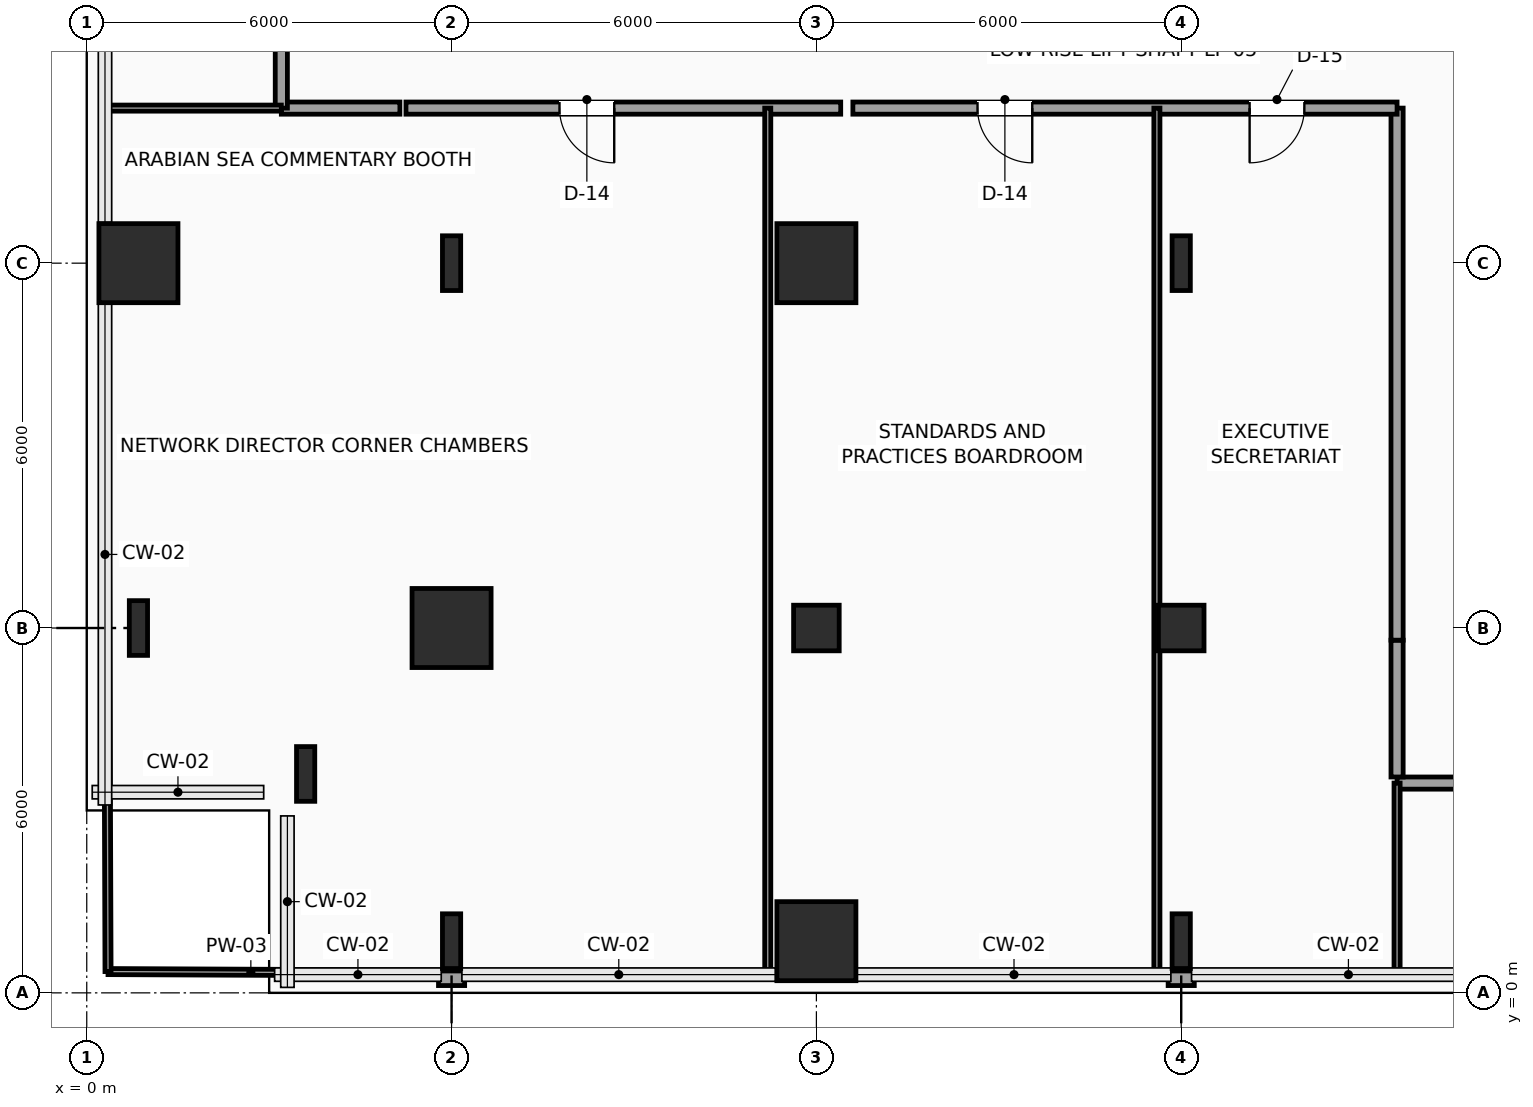
"""IFC4 building model, lengths in metres.
Left out: names, types, materials, properties, quantities, classifications, styles, units other than length and angle.
Written with IfcOpenShell. Run it as: python <this file> out.ifc"""

import sys

from ifc_helpers import new_model, si_unit, direction, frame, frame_2d, origin, origin_2d, place, context, subcontext, project, spatial, rectangle, hollow_rectangle, i_section, extrude, element, fill, save


model = new_model("IFC4")
c1 = context("Model", 3, precision=1e-05, world=origin(), true_north=direction((0.0, 1.0)))
c2 = subcontext(c1, "Body", "Model", "MODEL_VIEW")
j1 = project(units=[si_unit("LENGTHUNIT", "METRE"), si_unit("PLANEANGLEUNIT", "RADIAN")], contexts=[c1])
p1 = place(None, origin())
s1 = spatial("IfcSite", under=j1, at=p1, CompositionType="ELEMENT")
p2 = place(p1, origin())
s2 = spatial("IfcBuilding", under=s1, at=p2, CompositionType="ELEMENT")
p3 = place(p2, frame((0.0, 0.0, 87.0)))
s3 = spatial("IfcBuildingStorey", under=s2, at=p3, CompositionType="ELEMENT", Elevation=87.0)
for number, where, z_axis, x_axis in (
    (1, (3.6, 3.6, 0.0), (0.0, 0.0, 1.0), (1.0, 0.0, 0.0)),
    (2, (0.85, 6.0, 0.0), (0.0, 0.0, 1.0), (1.0, 0.0, 0.0)),
):
    element("IfcColumn", number, at=place(p3, frame(where, z_axis=z_axis, x_axis=x_axis)), inside=s3, PredefinedType="COLUMN", context=c2, shape_type="SweptSolid", body=[
        extrude(i_section(OverallWidth=0.3, OverallDepth=0.9, WebThickness=0.019, FlangeThickness=0.035, FilletRadius=0.03, at=origin_2d()), origin(), (0.0, 0.0, 1.0), 3.9),
    ])
p4 = place(p3, frame((0.85, 12.0, 0.0), z_axis=(0.0, 0.0, 1.0), x_axis=(1.0, 0.0, 0.0)))
e3 = element("IfcColumn", 3, at=p4, inside=s3, PredefinedType="COLUMN", context=c2, shape_type="SweptSolid", body=[
    extrude(rectangle(XDim=1.3, YDim=1.3, at=origin_2d()), origin(), (0.0, 0.0, 1.0), 3.9),
])
p5 = place(p3, frame((6.0, 0.85, 0.0), z_axis=(0.0, 0.0, 1.0), x_axis=(1.0, 0.0, 0.0)))
e4 = element("IfcColumn", 4, at=p5, inside=s3, PredefinedType="COLUMN", context=c2, shape_type="SweptSolid", body=[
    extrude(i_section(OverallWidth=0.3, OverallDepth=0.9, WebThickness=0.019, FlangeThickness=0.035, FilletRadius=0.03, at=origin_2d()), origin(), (0.0, 0.0, 1.0), 3.9),
])
p6 = place(p3, frame((6.0, 6.0, 0.0), z_axis=(0.0, 0.0, 1.0), x_axis=(1.0, 0.0, 0.0)))
e5 = element("IfcColumn", 5, at=p6, inside=s3, PredefinedType="COLUMN", context=c2, shape_type="SweptSolid", body=[
    extrude(rectangle(XDim=1.3, YDim=1.3, at=origin_2d()), origin(), (0.0, 0.0, 1.0), 3.9),
])
p7 = place(p3, frame((6.0, 12.0, 0.0), z_axis=(0.0, 0.0, 1.0), x_axis=(1.0, 0.0, 0.0)))
e6 = element("IfcColumn", 6, at=p7, inside=s3, PredefinedType="COLUMN", context=c2, shape_type="SweptSolid", body=[
    extrude(i_section(OverallWidth=0.3, OverallDepth=0.9, WebThickness=0.019, FlangeThickness=0.035, FilletRadius=0.03, at=origin_2d()), origin(), (0.0, 0.0, 1.0), 3.9),
])
p8 = place(p3, frame((12.0, 0.85, 0.0), z_axis=(0.0, 0.0, 1.0), x_axis=(1.0, 0.0, 0.0)))
e7 = element("IfcColumn", 7, at=p8, inside=s3, PredefinedType="COLUMN", context=c2, shape_type="SweptSolid", body=[
    extrude(rectangle(XDim=1.3, YDim=1.3, at=origin_2d()), origin(), (0.0, 0.0, 1.0), 3.9),
])
p9 = place(p3, frame((12.0, 6.0, 0.0), z_axis=(0.0, 0.0, 1.0), x_axis=(1.0, 0.0, 0.0)))
e8 = element("IfcColumn", 8, at=p9, inside=s3, PredefinedType="COLUMN", context=c2, shape_type="SweptSolid", body=[
    extrude(hollow_rectangle(XDim=0.75, YDim=0.75, WallThickness=0.035, InnerFilletRadius=0.035, OuterFilletRadius=0.05, at=origin_2d()), origin(), (0.0, 0.0, 1.0), 3.9),
])
p10 = place(p3, frame((12.0, 12.0, 0.0), z_axis=(0.0, 0.0, 1.0), x_axis=(1.0, 0.0, 0.0)))
e9 = element("IfcColumn", 9, at=p10, inside=s3, PredefinedType="COLUMN", context=c2, shape_type="SweptSolid", body=[
    extrude(rectangle(XDim=1.3, YDim=1.3, at=origin_2d()), origin(), (0.0, 0.0, 1.0), 3.9),
])
p11 = place(p3, frame((18.0, 0.85, 0.0), z_axis=(0.0, 0.0, 1.0), x_axis=(1.0, 0.0, 0.0)))
e10 = element("IfcColumn", 10, at=p11, inside=s3, PredefinedType="COLUMN", context=c2, shape_type="SweptSolid", body=[
    extrude(i_section(OverallWidth=0.3, OverallDepth=0.9, WebThickness=0.019, FlangeThickness=0.035, FilletRadius=0.03, at=origin_2d()), origin(), (0.0, 0.0, 1.0), 3.9),
])
p12 = place(p3, frame((18.0, 6.0, 0.0), z_axis=(0.0, 0.0, 1.0), x_axis=(1.0, 0.0, 0.0)))
e11 = element("IfcColumn", 11, at=p12, inside=s3, PredefinedType="COLUMN", context=c2, shape_type="SweptSolid", body=[
    extrude(hollow_rectangle(XDim=0.75, YDim=0.75, WallThickness=0.035, InnerFilletRadius=0.035, OuterFilletRadius=0.05, at=origin_2d()), origin(), (0.0, 0.0, 1.0), 3.9),
])
p13 = place(p3, frame((18.0, 12.0, 0.0), z_axis=(0.0, 0.0, 1.0), x_axis=(1.0, 0.0, 0.0)))
e12 = element("IfcColumn", 12, at=p13, inside=s3, PredefinedType="COLUMN", context=c2, shape_type="SweptSolid", body=[
    extrude(i_section(OverallWidth=0.3, OverallDepth=0.9, WebThickness=0.019, FlangeThickness=0.035, FilletRadius=0.03, at=origin_2d()), origin(), (0.0, 0.0, 1.0), 3.9),
])
for number, where, z_axis, x_axis in (
    (13, (18.215, 0.24, 0.0), (0.0, 0.0, 1.0), (-1.0, 0.0, 0.0)),
    (14, (6.215, 0.24, 0.0), (0.0, 0.0, 1.0), (-1.0, 0.0, 0.0)),
):
    element("IfcWall", number, at=place(p3, frame(where, z_axis=z_axis, x_axis=x_axis)), inside=s3, PredefinedType="SOLIDWALL", context=c2, shape_type="SweptSolid", body=[
        extrude(rectangle(XDim=0.43, YDim=0.24, at=frame_2d((0.215, 0.0))), origin(), (0.0, 0.0, 1.0), 3.65),
    ])
p14 = place(p3, frame((36.15, 3.45, 0.0), z_axis=(0.0, 0.0, 1.0), x_axis=(-1.0, 0.0, 0.0)))
e15 = element("IfcWall", 15, at=p14, inside=s3, PredefinedType="SOLIDWALL", context=c2, shape_type="SweptSolid", body=[
    extrude(rectangle(XDim=14.6, YDim=0.2, at=frame_2d((7.3, 0.0))), origin(), (0.0, 0.0, 1.0), 3.142),
])
p15 = place(p14, frame((11.325, 0.0, 0.0)))
e16 = element("IfcOpeningElement", 16, at=p15, cuts=e15, PredefinedType="OPENING", context=c2, shape_type="SweptSolid", body=[
    extrude(rectangle(XDim=0.9, YDim=2.1, at=frame_2d((0.45, 1.05))), frame((0.0, 0.11, 0.0), z_axis=(0.0, -1.0, 0.0), x_axis=(1.0, 0.0, 0.0)), (0.0, 0.0, 1.0), 0.22),
])
p16 = place(p14, frame((5.7, 0.0, 0.0)))
e17 = element("IfcOpeningElement", 17, at=p16, cuts=e15, PredefinedType="OPENING", context=c2, shape_type="SweptSolid", body=[
    extrude(rectangle(XDim=0.9, YDim=2.1, at=frame_2d((0.45, 1.05))), frame((0.0, 0.11, 0.0), z_axis=(0.0, -1.0, 0.0), x_axis=(1.0, 0.0, 0.0)), (0.0, 0.0, 1.0), 0.22),
])
p17 = place(p3, frame((21.55, 3.55, 0.0), z_axis=(0.0, 0.0, 1.0), x_axis=(0.0, 1.0, 0.0)))
e18 = element("IfcWall", 18, at=p17, inside=s3, PredefinedType="SOLIDWALL", context=c2, shape_type="SweptSolid", body=[
    extrude(rectangle(XDim=2.25, YDim=0.2, at=frame_2d((1.125, 0.0))), origin(), (0.0, 0.0, 1.0), 3.65),
])
p18 = place(p3, frame((21.55, 5.8, 0.0), z_axis=(0.0, 0.0, 1.0), x_axis=(0.0, 1.0, 0.0)))
e19 = element("IfcWall", 19, at=p18, inside=s3, PredefinedType="SOLIDWALL", context=c2, shape_type="SweptSolid", body=[
    extrude(rectangle(XDim=8.75, YDim=0.2, at=frame_2d((4.375, 0.0))), origin(), (0.0, 0.0, 1.0), 3.65),
])
p19 = place(p3, frame((21.55, 14.55, 0.0), z_axis=(0.0, 0.0, 1.0), x_axis=(-1.0, 0.0, 0.0)))
e20 = element("IfcWall", 20, at=p19, inside=s3, PredefinedType="SOLIDWALL", context=c2, shape_type="SweptSolid", body=[
    extrude(rectangle(XDim=8.95, YDim=0.2, at=frame_2d((4.475, 0.0))), origin(), (0.0, 0.0, 1.0), 3.65),
])
p20 = place(p19, frame((6.0, 0.0, 0.0)))
e21 = element("IfcOpeningElement", 21, at=p20, cuts=e20, PredefinedType="OPENING", context=c2, shape_type="SweptSolid", body=[
    extrude(rectangle(XDim=0.9, YDim=2.1, at=frame_2d((0.45, 1.05))), frame((0.0, 0.11, 0.0), z_axis=(0.0, -1.0, 0.0), x_axis=(1.0, 0.0, 0.0)), (0.0, 0.0, 1.0), 0.22),
])
p21 = place(p19, frame((1.525, 0.0, 0.0)))
e22 = element("IfcOpeningElement", 22, at=p21, cuts=e20, PredefinedType="OPENING", context=c2, shape_type="SweptSolid", body=[
    extrude(rectangle(XDim=0.9, YDim=2.1, at=frame_2d((0.45, 1.05))), frame((0.0, 0.11, 0.0), z_axis=(0.0, -1.0, 0.0), x_axis=(1.0, 0.0, 0.0)), (0.0, 0.0, 1.0), 0.22),
])
p22 = place(p3, frame((12.4, 14.55, 0.0), z_axis=(0.0, 0.0, 1.0), x_axis=(-1.0, 0.0, 0.0)))
e23 = element("IfcWall", 23, at=p22, inside=s3, PredefinedType="SOLIDWALL", context=c2, shape_type="SweptSolid", body=[
    extrude(rectangle(XDim=7.15, YDim=0.2, at=frame_2d((3.575, 0.0))), origin(), (0.0, 0.0, 1.0), 3.65),
])
p23 = place(p22, frame((3.725, 0.0, 0.0)))
e24 = element("IfcOpeningElement", 24, at=p23, cuts=e23, PredefinedType="OPENING", context=c2, shape_type="SweptSolid", body=[
    extrude(rectangle(XDim=0.9, YDim=2.1, at=frame_2d((0.45, 1.05))), frame((0.0, 0.11, 0.0), z_axis=(0.0, -1.0, 0.0), x_axis=(1.0, 0.0, 0.0)), (0.0, 0.0, 1.0), 0.22),
])
p24 = place(p3, frame((5.15, 14.55, 0.0), z_axis=(0.0, 0.0, 1.0), x_axis=(-1.0, 0.0, 0.0)))
e25 = element("IfcWall", 25, at=p24, inside=s3, PredefinedType="SOLIDWALL", context=c2, shape_type="SweptSolid", body=[
    extrude(rectangle(XDim=1.95, YDim=0.2, at=frame_2d((0.975, 0.0))), origin(), (0.0, 0.0, 1.0), 3.65),
])
p25 = place(p3, frame((3.2, 14.55, 0.0), z_axis=(0.0, 0.0, 1.0), x_axis=(0.0, 1.0, 0.0)))
e26 = element("IfcWall", 26, at=p25, inside=s3, PredefinedType="SOLIDWALL", context=c2, shape_type="SweptSolid", body=[
    extrude(rectangle(XDim=15.7, YDim=0.2, at=frame_2d((7.85, 0.0))), origin(), (0.0, 0.0, 1.0), 3.65),
])
p26 = place(p25, frame((2.65, 0.0, 0.0)))
e27 = element("IfcOpeningElement", 27, at=p26, cuts=e26, PredefinedType="OPENING", context=c2, shape_type="SweptSolid", body=[
    extrude(rectangle(XDim=0.9, YDim=2.1, at=frame_2d((0.45, 1.05))), frame((0.0, 0.11, 0.0), z_axis=(0.0, -1.0, 0.0), x_axis=(1.0, 0.0, 0.0)), (0.0, 0.0, 1.0), 0.22),
])
p27 = place(p25, frame((8.85, 0.0, 0.0)))
e28 = element("IfcOpeningElement", 28, at=p27, cuts=e26, PredefinedType="OPENING", context=c2, shape_type="SweptSolid", body=[
    extrude(rectangle(XDim=0.9, YDim=2.1, at=frame_2d((0.45, 1.05))), frame((0.0, 0.11, 0.0), z_axis=(0.0, -1.0, 0.0), x_axis=(1.0, 0.0, 0.0)), (0.0, 0.0, 1.0), 0.22),
])
p28 = place(p25, frame((13.6, 0.0, 0.0)))
e29 = element("IfcOpeningElement", 29, at=p28, cuts=e26, PredefinedType="OPENING", context=c2, shape_type="SweptSolid", body=[
    extrude(rectangle(XDim=0.9, YDim=2.1, at=frame_2d((0.45, 1.05))), frame((0.0, 0.11, 0.0), z_axis=(0.0, -1.0, 0.0), x_axis=(1.0, 0.0, 0.0)), (0.0, 0.0, 1.0), 0.22),
])
p29 = place(p3, frame((0.35, 0.35, 0.0), z_axis=(0.0, 0.0, 1.0), x_axis=(0.99998929595, -0.004626876487, 0.0)))
e30 = element("IfcWall", 30, at=p29, inside=s3, PredefinedType="PARTITIONING", context=c2, shape_type="SweptSolid", body=[
    extrude(rectangle(XDim=5.435, YDim=0.1, at=frame_2d((2.717, 0.0))), origin(), (0.0, 0.0, 1.0), 3.65),
])
p30 = place(p3, frame((6.215, 0.323, 0.0), z_axis=(0.0, 0.0, 1.0), x_axis=(0.999989402769, -0.00460373219, 0.0)))
e31 = element("IfcWall", 31, at=p30, inside=s3, PredefinedType="PARTITIONING", context=c2, shape_type="SweptSolid", body=[
    extrude(rectangle(XDim=4.985, YDim=0.1, at=frame_2d((2.492, 0.0))), origin(), (0.0, 0.0, 1.0), 3.65),
])
p31 = place(p3, frame((0.35, 0.35, 0.0), z_axis=(0.0, 0.0, 1.0), x_axis=(-0.003524555588, 0.999993788735, 0.0)))
e32 = element("IfcWall", 32, at=p31, inside=s3, PredefinedType="PARTITIONING", context=c2, shape_type="SweptSolid", body=[
    extrude(rectangle(XDim=14.2, YDim=0.1, at=frame_2d((7.1, 0.0))), origin(), (0.0, 0.0, 1.0), 3.65),
])
for number, where, z_axis, x_axis in (
    (33, (11.2, 0.3, 0.0), (0.0, 0.0, 1.0), (0.0, 1.0, 0.0)),
    (34, (17.6, 0.3, 0.0), (0.0, 0.0, 1.0), (0.0, 1.0, 0.0)),
):
    element("IfcWall", number, at=place(p3, frame(where, z_axis=z_axis, x_axis=x_axis)), inside=s3, PredefinedType="PARTITIONING", context=c2, shape_type="SweptSolid", body=[
        extrude(rectangle(XDim=14.25, YDim=0.1, at=frame_2d((7.125, 0.0))), origin(), (0.0, 0.0, 1.0), 3.65),
    ])
p32 = place(p3, frame((0.3, 14.55, 0.0), z_axis=(0.0, 0.0, 1.0), x_axis=(1.0, 0.0, 0.0)))
e35 = element("IfcWall", 35, at=p32, inside=s3, PredefinedType="PARTITIONING", context=c2, shape_type="SweptSolid", body=[
    extrude(rectangle(XDim=2.9, YDim=0.1, at=frame_2d((1.45, 0.0))), origin(), (0.0, 0.0, 1.0), 3.65),
])
p33 = place(p3, frame((21.55, 0.3, 0.0), z_axis=(0.0, 0.0, 1.0), x_axis=(0.0, 1.0, 0.0)))
e36 = element("IfcWall", 36, at=p33, inside=s3, PredefinedType="PARTITIONING", context=c2, shape_type="SweptSolid", body=[
    extrude(rectangle(XDim=3.15, YDim=0.1, at=frame_2d((1.575, 0.0))), origin(), (0.0, 0.0, 1.0), 3.65),
])
p34 = place(p20, origin())
e37 = element("IfcDoor", 37, at=p34, inside=s3, OperationType="SINGLE_SWING_LEFT", PredefinedType="DOOR", context=c2, shape_type="SweptSolid", body=[
    extrude(rectangle(XDim=0.9, YDim=2.1, at=frame_2d((0.45, 1.05))), frame((0.0, 0.025, 0.0), z_axis=(0.0, -1.0, 0.0), x_axis=(1.0, 0.0, 0.0)), (0.0, 0.0, 1.0), 0.05),
])
fill(e21, e37)
p35 = place(p21, origin())
e38 = element("IfcDoor", 38, at=p35, inside=s3, OperationType="SINGLE_SWING_RIGHT", PredefinedType="DOOR", context=c2, shape_type="SweptSolid", body=[
    extrude(rectangle(XDim=0.9, YDim=2.1, at=frame_2d((0.45, 1.05))), frame((0.0, 0.025, 0.0), z_axis=(0.0, -1.0, 0.0), x_axis=(1.0, 0.0, 0.0)), (0.0, 0.0, 1.0), 0.05),
])
fill(e22, e38)
p36 = place(p23, origin())
e39 = element("IfcDoor", 39, at=p36, inside=s3, OperationType="SINGLE_SWING_LEFT", PredefinedType="DOOR", context=c2, shape_type="SweptSolid", body=[
    extrude(rectangle(XDim=0.9, YDim=2.1, at=frame_2d((0.45, 1.05))), frame((0.0, 0.025, 0.0), z_axis=(0.0, -1.0, 0.0), x_axis=(1.0, 0.0, 0.0)), (0.0, 0.0, 1.0), 0.05),
])
fill(e24, e39)
save(model, sys.argv[1])
